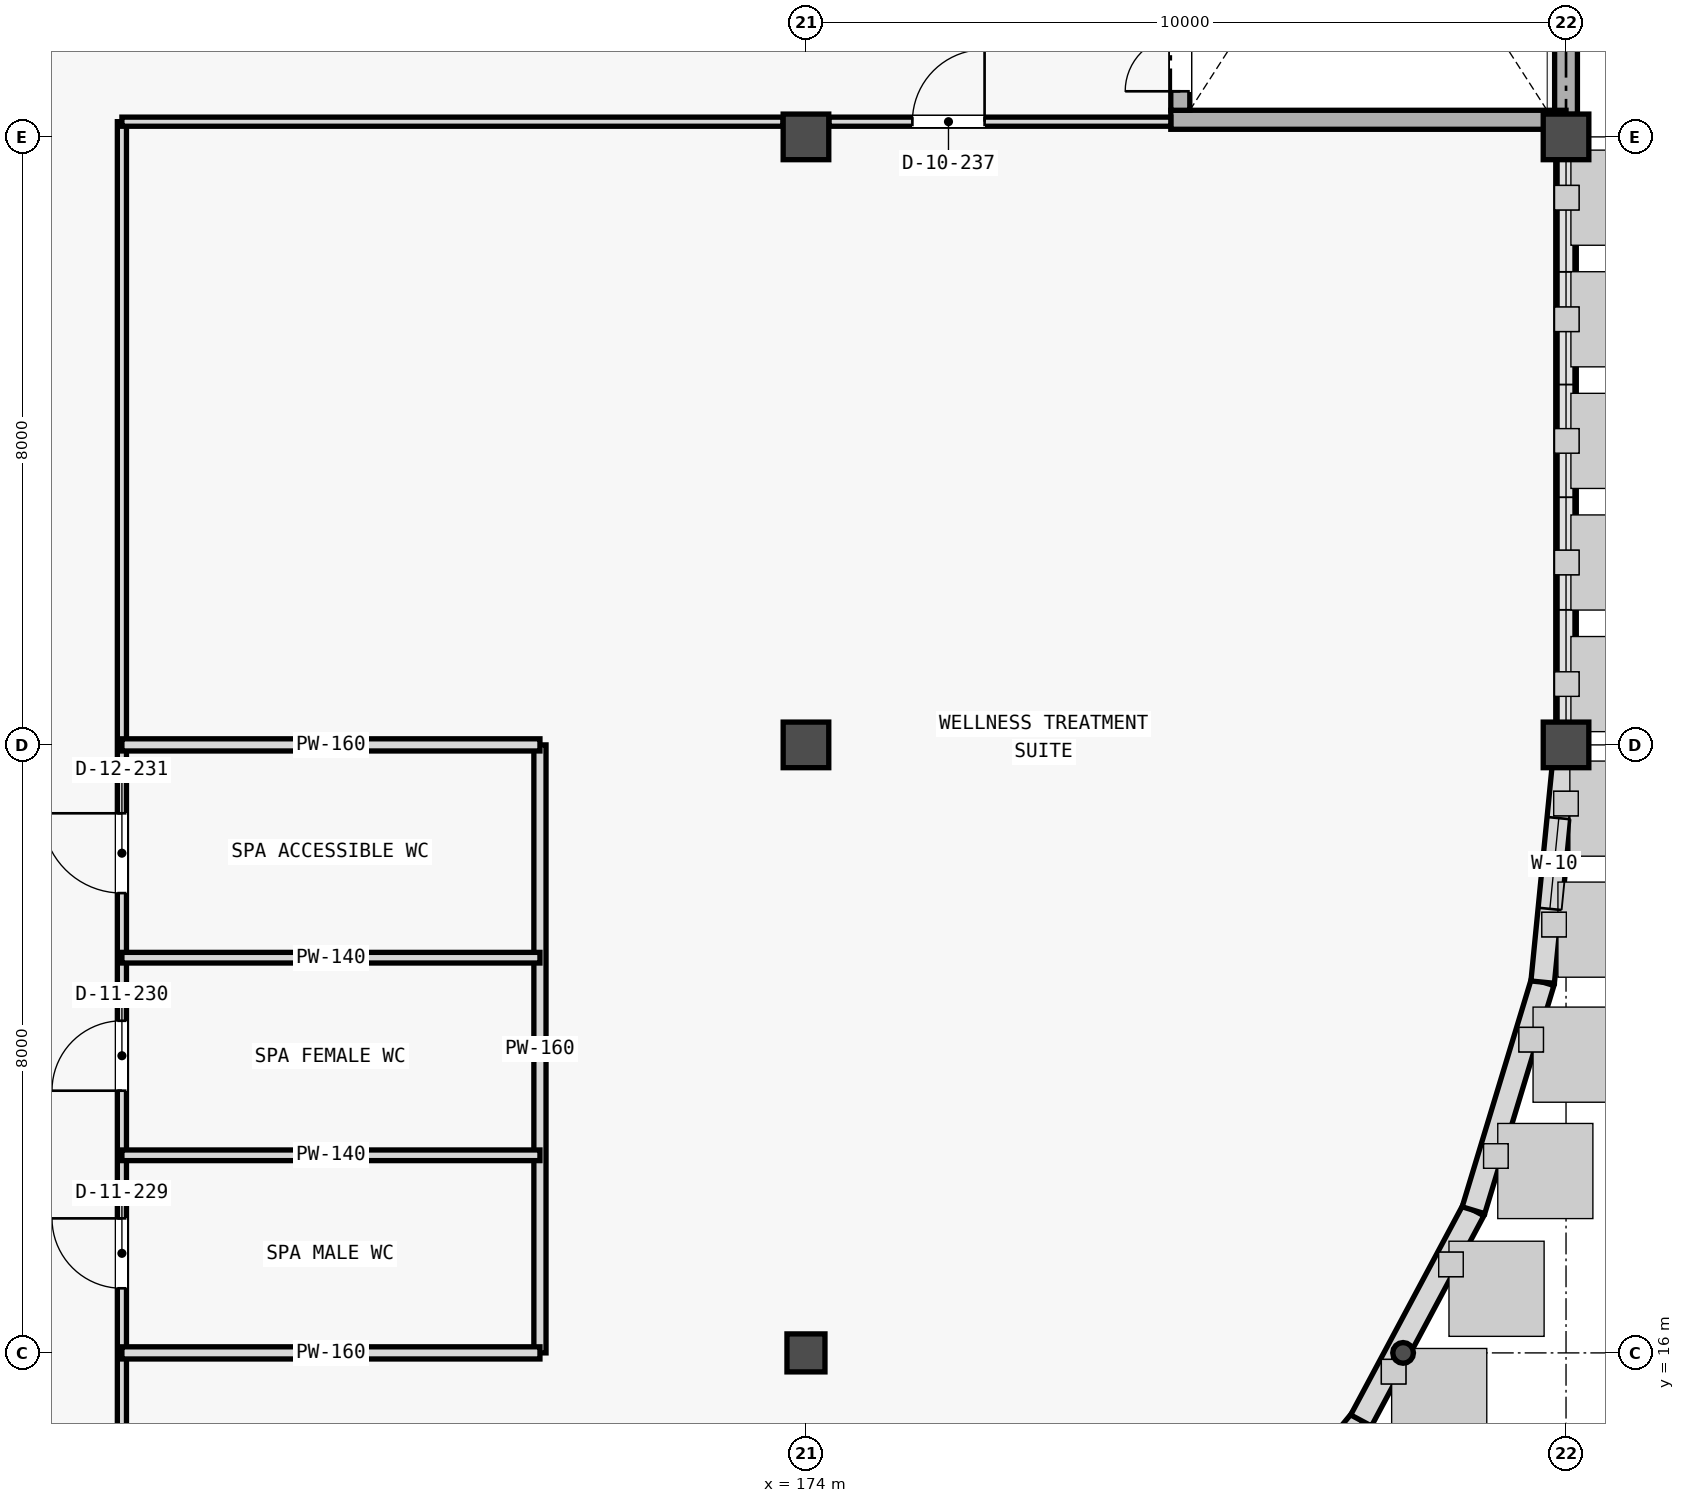
"""IFC4 building model, lengths in metres.
Left out: names, types, materials, properties, quantities, classifications, styles, units other than length and angle.
Written with IfcOpenShell. Run it as: python <this file> out.ifc"""

import sys

from ifc_helpers import new_model, si_unit, direction, frame, frame_2d, origin, origin_2d, place, context, subcontext, project, spatial, rectangle, hollow_circle, extrude, element, fill, save


model = new_model("IFC4")
c1 = context("Model", 3, precision=1e-05, world=origin(), true_north=direction((0.0, 1.0)))
c2 = subcontext(c1, "Body", "Model", "MODEL_VIEW")
j1 = project(units=[si_unit("LENGTHUNIT", "METRE"), si_unit("PLANEANGLEUNIT", "RADIAN")], contexts=[c1])
p1 = place(None, origin())
s1 = spatial("IfcSite", under=j1, at=p1, CompositionType="ELEMENT")
p2 = place(p1, origin())
s2 = spatial("IfcBuilding", under=s1, at=p2, CompositionType="ELEMENT")
p3 = place(p2, frame((0.0, 0.0, 10.2)))
s3 = spatial("IfcBuildingStorey", under=s2, at=p3, CompositionType="ELEMENT", Elevation=10.2)
p4 = place(p3, frame((174.0, 16.0, 0.0), z_axis=(0.0, 0.0, 1.0), x_axis=(1.0, 0.0, 0.0)))
e1 = element("IfcColumn", 1, at=p4, inside=s3, PredefinedType="COLUMN", context=c2, shape_type="SweptSolid", body=[
    extrude(rectangle(XDim=0.5, YDim=0.5, at=origin_2d()), origin(), (0.0, 0.0, 1.0), 3.96),
])
for number, where, z_axis, x_axis in (
    (2, (174.0, 24.0, 0.0), (0.0, 0.0, 1.0), (1.0, 0.0, 0.0)),
    (3, (184.0, 24.0, 0.0), (0.0, 0.0, 1.0), (1.0, 0.0, 0.0)),
    (4, (174.0, 32.0, 0.0), (0.0, 0.0, 1.0), (1.0, 0.0, 0.0)),
    (5, (184.0, 32.0, 0.0), (0.0, 0.0, 1.0), (1.0, 0.0, 0.0)),
):
    element("IfcColumn", number, at=place(p3, frame(where, z_axis=z_axis, x_axis=x_axis)), inside=s3, PredefinedType="COLUMN", context=c2, shape_type="SweptSolid", body=[
        extrude(rectangle(XDim=0.6, YDim=0.6, at=origin_2d()), origin(), (0.0, 0.0, 1.0), 3.96),
    ])
p5 = place(p3, frame((181.856, 16.0, 0.0), z_axis=(0.0, 0.0, 1.0), x_axis=(1.0, 0.0, 0.0)))
e6 = element("IfcColumn", 6, at=p5, inside=s3, PredefinedType="PILASTER", context=c2, shape_type="SweptSolid", body=[
    extrude(hollow_circle(Radius=0.136, WallThickness=0.012, at=origin_2d()), origin(), (0.0, 0.0, 1.0), 3.96),
])
p6 = place(p3, frame((184.0, 24.296, 0.0), z_axis=(0.0, 0.0, 1.0), x_axis=(0.0, 1.0, 0.0)))
e7 = element("IfcWall", 7, at=p6, inside=s3, PredefinedType="STANDARD", context=c2, shape_type="SweptSolid", body=[
    extrude(rectangle(XDim=7.408, YDim=0.27, at=frame_2d((3.704, 0.0))), origin(), (0.0, 0.0, 1.0), 0.8),
])
p7 = place(p3, frame((184.0, 32.296, 0.0), z_axis=(0.0, 0.0, 1.0), x_axis=(0.0, 1.0, 0.0)))
e8 = element("IfcWall", 8, at=p7, inside=s3, PredefinedType="SHEAR", context=c2, shape_type="SweptSolid", body=[
    extrude(rectangle(XDim=7.408, YDim=0.3, at=frame_2d((3.704, 0.0))), origin(), (0.0, 0.0, 1.0), 4.2),
])
p8 = place(p3, frame((179.314, 12.686, 0.0), z_axis=(0.0, 0.0, 1.0), x_axis=(0.634385792339, 0.773016601683, 0.0)))
e9 = element("IfcWall", 9, at=p8, inside=s3, PredefinedType="STANDARD", context=c2, shape_type="SweptSolid", body=[
    extrude(rectangle(XDim=3.136, YDim=0.31, at=frame_2d((1.568, 0.0))), origin(), (0.0, 0.0, 1.0), 3.7),
])
p9 = place(p8, frame((1.018, 0.0, 1.0)))
e10 = element("IfcOpeningElement", 10, at=p9, cuts=e9, PredefinedType="OPENING", context=c2, shape_type="SweptSolid", body=[
    extrude(rectangle(XDim=1.1, YDim=1.85, at=frame_2d((0.55, 0.925))), frame((0.0, 0.165, 0.0), z_axis=(0.0, -1.0, 0.0), x_axis=(1.0, 0.0, 0.0)), (0.0, 0.0, 1.0), 0.33),
])
p10 = place(p3, frame((181.303, 15.111, 0.0), z_axis=(0.0, 0.0, 1.0), x_axis=(0.471396060548, 0.881921625826, 0.0)))
e11 = element("IfcWall", 11, at=p10, inside=s3, PredefinedType="STANDARD", context=c2, shape_type="SweptSolid", body=[
    extrude(rectangle(XDim=3.136, YDim=0.31, at=frame_2d((1.568, 0.0))), origin(), (0.0, 0.0, 1.0), 3.39),
])
p11 = place(p3, frame((182.782, 17.877, 0.0), z_axis=(0.0, 0.0, 1.0), x_axis=(0.29030980253, 0.956932713703, 0.0)))
e12 = element("IfcWall", 12, at=p11, inside=s3, PredefinedType="STANDARD", context=c2, shape_type="SweptSolid", body=[
    extrude(rectangle(XDim=3.137, YDim=0.31, at=frame_2d((1.568, 0.0))), origin(), (0.0, 0.0, 1.0), 3.7),
])
p12 = place(p3, frame((183.693, 20.879, 0.0), z_axis=(0.0, 0.0, 1.0), x_axis=(0.098000751113, 0.995186340733, 0.0)))
e13 = element("IfcWall", 13, at=p12, inside=s3, PredefinedType="STANDARD", context=c2, shape_type="SweptSolid", body=[
    extrude(rectangle(XDim=3.136, YDim=0.31, at=frame_2d((1.568, 0.0))), origin(), (0.0, 0.0, 1.0), 3.24),
])
p13 = place(p12, frame((0.968, 0.0, 1.0)))
e14 = element("IfcOpeningElement", 14, at=p13, cuts=e13, PredefinedType="OPENING", context=c2, shape_type="SweptSolid", body=[
    extrude(rectangle(XDim=1.2, YDim=1.6, at=frame_2d((0.6, 0.8))), frame((0.0, 0.165, 0.0), z_axis=(0.0, -1.0, 0.0), x_axis=(1.0, 0.0, 0.0)), (0.0, 0.0, 1.0), 0.33),
])
p14 = place(p3, frame((178.8, 32.225, 0.0), z_axis=(0.0, 0.0, 1.0), x_axis=(1.0, 0.0, 0.0)))
e15 = element("IfcWall", 15, at=p14, inside=s3, PredefinedType="SHEAR", context=c2, shape_type="SweptSolid", body=[
    extrude(rectangle(XDim=5.2, YDim=0.25, at=frame_2d((2.6, 0.0))), origin(), (0.0, 0.0, 1.0), 4.2),
])
p15 = place(p3, frame((178.925, 32.35, 0.0), z_axis=(0.0, 0.0, 1.0), x_axis=(0.0, 1.0, 0.0)))
e16 = element("IfcWall", 16, at=p15, inside=s3, PredefinedType="SHEAR", context=c2, shape_type="SweptSolid", body=[
    extrude(rectangle(XDim=7.3, YDim=0.25, at=frame_2d((3.65, 0.0))), origin(), (0.0, 0.0, 1.0), 4.2),
])
p16 = place(p15, frame((0.25, 0.0, 0.0)))
e17 = element("IfcOpeningElement", 17, at=p16, cuts=e16, PredefinedType="OPENING", context=c2, shape_type="SweptSolid", body=[
    extrude(rectangle(XDim=1.45, YDim=2.2, at=frame_2d((0.725, 1.1))), frame((0.0, 0.135, 0.0), z_axis=(0.0, -1.0, 0.0), x_axis=(1.0, 0.0, 0.0)), (0.0, 0.0, 1.0), 0.27),
])
p17 = place(p3, frame((165.0, 8.15, 0.0), z_axis=(0.0, 0.0, 1.0), x_axis=(0.0, 1.0, 0.0)))
e18 = element("IfcWall", 18, at=p17, inside=s3, PredefinedType="PARTITIONING", context=c2, shape_type="SweptSolid", body=[
    extrude(rectangle(XDim=24.05, YDim=0.12, at=frame_2d((12.025, 0.0))), origin(), (0.0, 0.0, 1.0), 3.24),
])
p18 = place(p17, frame((8.7, 0.0, 0.0)))
e19 = element("IfcOpeningElement", 19, at=p18, cuts=e18, PredefinedType="OPENING", context=c2, shape_type="SweptSolid", body=[
    extrude(rectangle(XDim=0.92, YDim=2.1, at=frame_2d((0.46, 1.05))), frame((0.0, 0.07, 0.0), z_axis=(0.0, -1.0, 0.0), x_axis=(1.0, 0.0, 0.0)), (0.0, 0.0, 1.0), 0.14),
])
p19 = place(p17, frame((11.3, 0.0, 0.0)))
e20 = element("IfcOpeningElement", 20, at=p19, cuts=e18, PredefinedType="OPENING", context=c2, shape_type="SweptSolid", body=[
    extrude(rectangle(XDim=0.92, YDim=2.1, at=frame_2d((0.46, 1.05))), frame((0.0, 0.07, 0.0), z_axis=(0.0, -1.0, 0.0), x_axis=(1.0, 0.0, 0.0)), (0.0, 0.0, 1.0), 0.14),
])
p20 = place(p17, frame((13.9, 0.0, 0.0)))
e21 = element("IfcOpeningElement", 21, at=p20, cuts=e18, PredefinedType="OPENING", context=c2, shape_type="SweptSolid", body=[
    extrude(rectangle(XDim=1.05, YDim=2.15, at=frame_2d((0.525, 1.075))), frame((0.0, 0.07, 0.0), z_axis=(0.0, -1.0, 0.0), x_axis=(1.0, 0.0, 0.0)), (0.0, 0.0, 1.0), 0.14),
])
p21 = place(p3, frame((170.5, 16.0, 0.0), z_axis=(0.0, 0.0, 1.0), x_axis=(0.0, 1.0, 0.0)))
e22 = element("IfcWall", 22, at=p21, inside=s3, PredefinedType="PARTITIONING", context=c2, shape_type="SweptSolid", body=[
    extrude(rectangle(XDim=8.0, YDim=0.16, at=frame_2d((4.0, 0.0))), origin(), (0.0, 0.0, 1.0), 3.24),
])
p22 = place(p3, frame((165.0, 16.0, 0.0), z_axis=(0.0, 0.0, 1.0), x_axis=(1.0, 0.0, 0.0)))
e23 = element("IfcWall", 23, at=p22, inside=s3, PredefinedType="PARTITIONING", context=c2, shape_type="SweptSolid", body=[
    extrude(rectangle(XDim=5.5, YDim=0.16, at=frame_2d((2.75, 0.0))), origin(), (0.0, 0.0, 1.0), 3.24),
])
for number, where, z_axis, x_axis in (
    (24, (165.0, 18.6, 0.0), (0.0, 0.0, 1.0), (1.0, 0.0, 0.0)),
    (25, (165.0, 21.2, 0.0), (0.0, 0.0, 1.0), (1.0, 0.0, 0.0)),
):
    element("IfcWall", number, at=place(p3, frame(where, z_axis=z_axis, x_axis=x_axis)), inside=s3, PredefinedType="PLUMBINGWALL", context=c2, shape_type="SweptSolid", body=[
        extrude(rectangle(XDim=5.5, YDim=0.14, at=frame_2d((2.75, 0.0))), origin(), (0.0, 0.0, 1.0), 3.67),
    ])
p23 = place(p3, frame((165.0, 24.0, 0.0), z_axis=(0.0, 0.0, 1.0), x_axis=(1.0, 0.0, 0.0)))
e26 = element("IfcWall", 26, at=p23, inside=s3, PredefinedType="PARTITIONING", context=c2, shape_type="SweptSolid", body=[
    extrude(rectangle(XDim=5.5, YDim=0.16, at=frame_2d((2.75, 0.0))), origin(), (0.0, 0.0, 1.0), 3.24),
])
p24 = place(p3, frame((165.0, 32.2, 0.0), z_axis=(0.0, 0.0, 1.0), x_axis=(1.0, 0.0, 0.0)))
e27 = element("IfcWall", 27, at=p24, inside=s3, PredefinedType="PARTITIONING", context=c2, shape_type="SweptSolid", body=[
    extrude(rectangle(XDim=8.698, YDim=0.12, at=frame_2d((4.349, 0.0))), origin(), (0.0, 0.0, 1.0), 3.24),
])
p25 = place(p3, frame((174.302, 32.2, 0.0), z_axis=(0.0, 0.0, 1.0), x_axis=(1.0, 0.0, 0.0)))
e28 = element("IfcWall", 28, at=p25, inside=s3, PredefinedType="PARTITIONING", context=c2, shape_type="SweptSolid", body=[
    extrude(rectangle(XDim=4.498, YDim=0.12, at=frame_2d((2.249, 0.0))), origin(), (0.0, 0.0, 1.0), 3.24),
])
p26 = place(p25, frame((1.098, 0.0, 0.0)))
e29 = element("IfcOpeningElement", 29, at=p26, cuts=e28, PredefinedType="OPENING", context=c2, shape_type="SweptSolid", body=[
    extrude(rectangle(XDim=0.95, YDim=2.15, at=frame_2d((0.475, 1.075))), frame((0.0, 0.07, 0.0), z_axis=(0.0, -1.0, 0.0), x_axis=(1.0, 0.0, 0.0)), (0.0, 0.0, 1.0), 0.14),
])
p27 = place(p13, origin())
e30 = element("IfcWindow", 30, at=p27, inside=s3, PartitioningType="SINGLE_PANEL", PredefinedType="WINDOW", context=c2, shape_type="SweptSolid", body=[
    extrude(rectangle(XDim=1.2, YDim=1.6, at=frame_2d((0.6, 0.8))), frame((0.0, 0.03, 0.0), z_axis=(0.0, -1.0, 0.0), x_axis=(1.0, 0.0, 0.0)), (0.0, 0.0, 1.0), 0.06),
])
fill(e14, e30)
p28 = place(p16, origin())
e31 = element("IfcDoor", 31, at=p28, inside=s3, OperationType="DOUBLE_DOOR_SINGLE_SWING", PredefinedType="DOOR", context=c2, shape_type="SweptSolid", body=[
    extrude(rectangle(XDim=1.45, YDim=2.2, at=frame_2d((0.725, 1.1))), frame((0.0, 0.025, 0.0), z_axis=(0.0, -1.0, 0.0), x_axis=(1.0, 0.0, 0.0)), (0.0, 0.0, 1.0), 0.05),
])
fill(e17, e31)
p29 = place(p18, origin())
e32 = element("IfcDoor", 32, at=p29, inside=s3, OperationType="SINGLE_SWING_RIGHT", PredefinedType="DOOR", context=c2, shape_type="SweptSolid", body=[
    extrude(rectangle(XDim=0.92, YDim=2.1, at=frame_2d((0.46, 1.05))), frame((0.0, 0.025, 0.0), z_axis=(0.0, -1.0, 0.0), x_axis=(1.0, 0.0, 0.0)), (0.0, 0.0, 1.0), 0.05),
])
fill(e19, e32)
p30 = place(p19, origin())
e33 = element("IfcDoor", 33, at=p30, inside=s3, OperationType="SINGLE_SWING_LEFT", PredefinedType="DOOR", context=c2, shape_type="SweptSolid", body=[
    extrude(rectangle(XDim=0.92, YDim=2.1, at=frame_2d((0.46, 1.05))), frame((0.0, 0.025, 0.0), z_axis=(0.0, -1.0, 0.0), x_axis=(1.0, 0.0, 0.0)), (0.0, 0.0, 1.0), 0.05),
])
fill(e20, e33)
p31 = place(p20, origin())
e34 = element("IfcDoor", 34, at=p31, inside=s3, OperationType="SINGLE_SWING_RIGHT", PredefinedType="DOOR", context=c2, shape_type="SweptSolid", body=[
    extrude(rectangle(XDim=1.05, YDim=2.15, at=frame_2d((0.525, 1.075))), frame((0.0, 0.025, 0.0), z_axis=(0.0, -1.0, 0.0), x_axis=(1.0, 0.0, 0.0)), (0.0, 0.0, 1.0), 0.05),
])
fill(e21, e34)
p32 = place(p26, origin())
e35 = element("IfcDoor", 35, at=p32, inside=s3, OperationType="SINGLE_SWING_RIGHT", PredefinedType="DOOR", context=c2, shape_type="SweptSolid", body=[
    extrude(rectangle(XDim=0.95, YDim=2.15, at=frame_2d((0.475, 1.075))), frame((0.0, 0.025, 0.0), z_axis=(0.0, -1.0, 0.0), x_axis=(1.0, 0.0, 0.0)), (0.0, 0.0, 1.0), 0.05),
])
fill(e29, e35)
save(model, sys.argv[1])
